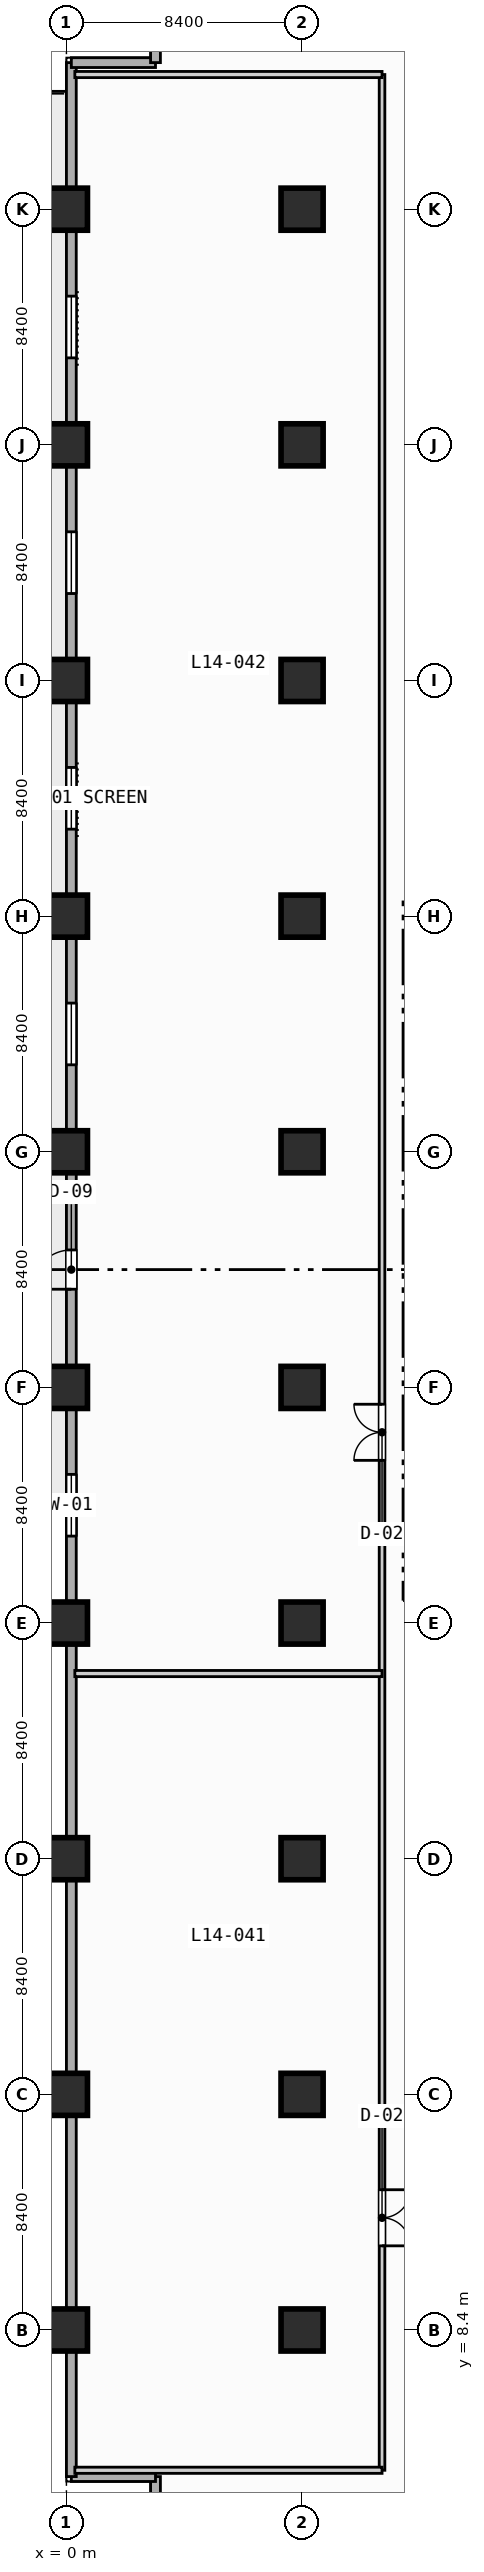
"""IFC4 building model, lengths in metres.
Left out: names, types, materials, properties, quantities, classifications, styles, units other than length and angle.
Written with IfcOpenShell. Run it as: python <this file> out.ifc"""

import sys

from ifc_helpers import new_model, si_unit, direction, frame, frame_2d, origin, origin_2d, place, context, subcontext, project, spatial, rectangle, extrude, element, fill, save


model = new_model("IFC4")
c1 = context("Model", 3, precision=1e-05, world=origin(), true_north=direction((0.0, 1.0)))
c2 = subcontext(c1, "Body", "Model", "MODEL_VIEW")
j1 = project(units=[si_unit("LENGTHUNIT", "METRE"), si_unit("PLANEANGLEUNIT", "RADIAN")], contexts=[c1])
p1 = place(None, origin())
s1 = spatial("IfcSite", under=j1, at=p1, CompositionType="ELEMENT")
p2 = place(p1, origin())
s2 = spatial("IfcBuilding", under=s1, at=p2, CompositionType="ELEMENT")
p3 = place(p2, frame((0.0, 0.0, 62.4)))
s3 = spatial("IfcBuildingStorey", under=s2, at=p3, CompositionType="ELEMENT", Elevation=62.4)
for number, where, z_axis, x_axis in (
    (1, (0.0, 8.4, 0.0), (0.0, 0.0, 1.0), (1.0, 0.0, 0.0)),
    (2, (0.0, 16.8, 0.0), (0.0, 0.0, 1.0), (1.0, 0.0, 0.0)),
    (3, (0.0, 25.2, 0.0), (0.0, 0.0, 1.0), (1.0, 0.0, 0.0)),
    (4, (0.0, 33.6, 0.0), (0.0, 0.0, 1.0), (1.0, 0.0, 0.0)),
    (5, (0.0, 42.0, 0.0), (0.0, 0.0, 1.0), (1.0, 0.0, 0.0)),
    (6, (0.0, 50.4, 0.0), (0.0, 0.0, 1.0), (1.0, 0.0, 0.0)),
    (7, (0.0, 58.8, 0.0), (0.0, 0.0, 1.0), (1.0, 0.0, 0.0)),
    (8, (0.0, 67.2, 0.0), (0.0, 0.0, 1.0), (1.0, 0.0, 0.0)),
    (9, (0.0, 75.6, 0.0), (0.0, 0.0, 1.0), (1.0, 0.0, 0.0)),
    (10, (0.0, 84.0, 0.0), (0.0, 0.0, 1.0), (1.0, 0.0, 0.0)),
    (11, (8.4, 8.4, 0.0), (0.0, 0.0, 1.0), (1.0, 0.0, 0.0)),
    (12, (8.4, 16.8, 0.0), (0.0, 0.0, 1.0), (1.0, 0.0, 0.0)),
    (13, (8.4, 25.2, 0.0), (0.0, 0.0, 1.0), (1.0, 0.0, 0.0)),
    (14, (8.4, 33.6, 0.0), (0.0, 0.0, 1.0), (1.0, 0.0, 0.0)),
    (15, (8.4, 42.0, 0.0), (0.0, 0.0, 1.0), (1.0, 0.0, 0.0)),
    (16, (8.4, 50.4, 0.0), (0.0, 0.0, 1.0), (1.0, 0.0, 0.0)),
    (17, (8.4, 58.8, 0.0), (0.0, 0.0, 1.0), (1.0, 0.0, 0.0)),
    (18, (8.4, 67.2, 0.0), (0.0, 0.0, 1.0), (1.0, 0.0, 0.0)),
    (19, (8.4, 75.6, 0.0), (0.0, 0.0, 1.0), (1.0, 0.0, 0.0)),
    (20, (8.4, 84.0, 0.0), (0.0, 0.0, 1.0), (1.0, 0.0, 0.0)),
):
    element("IfcColumn", number, at=place(p3, frame(where, z_axis=z_axis, x_axis=x_axis)), inside=s3, PredefinedType="COLUMN", context=c2, shape_type="SweptSolid", body=[
        extrude(rectangle(XDim=1.5, YDim=1.5, at=origin_2d()), origin(), (0.0, 0.0, 1.0), 3.8),
    ])
for number, where, z_axis, x_axis in (
    (21, (3.175, 0.175, 0.0), (0.0, 0.0, 1.0), (0.0, 1.0, 0.0)),
    (22, (3.175, 3.175, 0.0), (0.0, 0.0, 1.0), (-1.0, 0.0, 0.0)),
):
    element("IfcWall", number, at=place(p3, frame(where, z_axis=z_axis, x_axis=x_axis)), inside=s3, PredefinedType="STANDARD", context=c2, shape_type="SweptSolid", body=[
        extrude(rectangle(XDim=3.0, YDim=0.35, at=frame_2d((1.5, 0.0))), origin(), (0.0, 0.0, 1.0), 3.55),
    ])
p4 = place(p3, frame((0.175, 3.175, 0.0), z_axis=(0.0, 0.0, 1.0), x_axis=(0.0, 1.0, 0.0)))
e23 = element("IfcWall", 23, at=p4, inside=s3, PredefinedType="STANDARD", context=c2, shape_type="SweptSolid", body=[
    extrude(rectangle(XDim=86.05, YDim=0.35, at=frame_2d((43.025, 0.0))), origin(), (0.0, 0.0, 1.0), 3.55),
])
p5 = place(p4, frame((42.325, 0.0, 0.0)))
e24 = element("IfcOpeningElement", 24, at=p5, cuts=e23, PredefinedType="OPENING", context=c2, shape_type="SweptSolid", body=[
    extrude(rectangle(XDim=1.4, YDim=2.2, at=frame_2d((0.7, 1.1))), frame((0.0, 0.185, 0.0), z_axis=(0.0, -1.0, 0.0), x_axis=(1.0, 0.0, 0.0)), (0.0, 0.0, 1.0), 0.37),
])
p6 = place(p4, frame((33.525, 0.0, 0.85)))
e25 = element("IfcOpeningElement", 25, at=p6, cuts=e23, PredefinedType="OPENING", context=c2, shape_type="SweptSolid", body=[
    extrude(rectangle(XDim=2.2, YDim=1.8, at=frame_2d((1.1, 0.9))), frame((0.0, 0.185, 0.0), z_axis=(0.0, -1.0, 0.0), x_axis=(1.0, 0.0, 0.0)), (0.0, 0.0, 1.0), 0.37),
])
p7 = place(p4, frame((50.325, 0.0, 0.85)))
e26 = element("IfcOpeningElement", 26, at=p7, cuts=e23, PredefinedType="OPENING", context=c2, shape_type="SweptSolid", body=[
    extrude(rectangle(XDim=2.2, YDim=1.8, at=frame_2d((1.1, 0.9))), frame((0.0, 0.185, 0.0), z_axis=(0.0, -1.0, 0.0), x_axis=(1.0, 0.0, 0.0)), (0.0, 0.0, 1.0), 0.37),
])
p8 = place(p4, frame((58.725, 0.0, 0.85)))
e27 = element("IfcOpeningElement", 27, at=p8, cuts=e23, PredefinedType="OPENING", context=c2, shape_type="SweptSolid", body=[
    extrude(rectangle(XDim=2.2, YDim=1.8, at=frame_2d((1.1, 0.9))), frame((0.0, 0.185, 0.0), z_axis=(0.0, -1.0, 0.0), x_axis=(1.0, 0.0, 0.0)), (0.0, 0.0, 1.0), 0.37),
])
p9 = place(p4, frame((67.125, 0.0, 0.85)))
e28 = element("IfcOpeningElement", 28, at=p9, cuts=e23, PredefinedType="OPENING", context=c2, shape_type="SweptSolid", body=[
    extrude(rectangle(XDim=2.2, YDim=1.8, at=frame_2d((1.1, 0.9))), frame((0.0, 0.185, 0.0), z_axis=(0.0, -1.0, 0.0), x_axis=(1.0, 0.0, 0.0)), (0.0, 0.0, 1.0), 0.37),
])
p10 = place(p4, frame((75.525, 0.0, 0.85)))
e29 = element("IfcOpeningElement", 29, at=p10, cuts=e23, PredefinedType="OPENING", context=c2, shape_type="SweptSolid", body=[
    extrude(rectangle(XDim=2.2, YDim=1.8, at=frame_2d((1.1, 0.9))), frame((0.0, 0.185, 0.0), z_axis=(0.0, -1.0, 0.0), x_axis=(1.0, 0.0, 0.0)), (0.0, 0.0, 1.0), 0.37),
])
for number, where, z_axis, x_axis in (
    (30, (0.175, 89.225, 0.0), (0.0, 0.0, 1.0), (1.0, 0.0, 0.0)),
    (31, (3.175, 89.225, 0.0), (0.0, 0.0, 1.0), (0.0, 1.0, 0.0)),
):
    element("IfcWall", number, at=place(p3, frame(where, z_axis=z_axis, x_axis=x_axis)), inside=s3, PredefinedType="STANDARD", context=c2, shape_type="SweptSolid", body=[
        extrude(rectangle(XDim=3.0, YDim=0.35, at=frame_2d((1.5, 0.0))), origin(), (0.0, 0.0, 1.0), 3.55),
    ])
p11 = place(p3, frame((11.25, 3.4, 0.0), z_axis=(0.0, 0.0, 1.0), x_axis=(0.0, 1.0, 0.0)))
e32 = element("IfcWall", 32, at=p11, inside=s3, PredefinedType="PARTITIONING", context=c2, shape_type="SweptSolid", body=[
    extrude(rectangle(XDim=85.4, YDim=0.2, at=frame_2d((42.7, 0.0))), origin(), (0.0, 0.0, 1.0), 3.55),
])
p12 = place(p11, frame((8.0, 0.0, 0.0)))
e33 = element("IfcOpeningElement", 33, at=p12, cuts=e32, PredefinedType="OPENING", context=c2, shape_type="SweptSolid", body=[
    extrude(rectangle(XDim=2.0, YDim=2.15, at=frame_2d((1.0, 1.075))), frame((0.0, 0.11, 0.0), z_axis=(0.0, -1.0, 0.0), x_axis=(1.0, 0.0, 0.0)), (0.0, 0.0, 1.0), 0.22),
])
p13 = place(p11, frame((36.0, 0.0, 0.0)))
e34 = element("IfcOpeningElement", 34, at=p13, cuts=e32, PredefinedType="OPENING", context=c2, shape_type="SweptSolid", body=[
    extrude(rectangle(XDim=2.0, YDim=2.15, at=frame_2d((1.0, 1.075))), frame((0.0, 0.11, 0.0), z_axis=(0.0, -1.0, 0.0), x_axis=(1.0, 0.0, 0.0)), (0.0, 0.0, 1.0), 0.22),
])
for number, where, z_axis, x_axis in (
    (35, (0.3, 3.4, 0.0), (0.0, 0.0, 1.0), (1.0, 0.0, 0.0)),
    (36, (0.3, 31.8, 0.0), (0.0, 0.0, 1.0), (1.0, 0.0, 0.0)),
    (37, (0.3, 88.8, 0.0), (0.0, 0.0, 1.0), (1.0, 0.0, 0.0)),
):
    element("IfcWall", number, at=place(p3, frame(where, z_axis=z_axis, x_axis=x_axis)), inside=s3, PredefinedType="PARTITIONING", context=c2, shape_type="SweptSolid", body=[
        extrude(rectangle(XDim=10.95, YDim=0.22, at=frame_2d((5.475, 0.0))), origin(), (0.0, 0.0, 1.0), 3.55),
    ])
p14 = place(p5, origin())
e38 = element("IfcDoor", 38, at=p14, inside=s3, OperationType="SINGLE_SWING_LEFT", PredefinedType="DOOR", context=c2, shape_type="SweptSolid", body=[
    extrude(rectangle(XDim=1.4, YDim=2.2, at=frame_2d((0.7, 1.1))), frame((0.0, 0.025, 0.0), z_axis=(0.0, -1.0, 0.0), x_axis=(1.0, 0.0, 0.0)), (0.0, 0.0, 1.0), 0.05),
])
fill(e24, e38)
p15 = place(p6, origin())
e39 = element("IfcWindow", 39, at=p15, inside=s3, PartitioningType="SINGLE_PANEL", PredefinedType="WINDOW", context=c2, shape_type="SweptSolid", body=[
    extrude(rectangle(XDim=2.2, YDim=1.8, at=frame_2d((1.1, 0.9))), frame((0.0, 0.03, 0.0), z_axis=(0.0, -1.0, 0.0), x_axis=(1.0, 0.0, 0.0)), (0.0, 0.0, 1.0), 0.06),
])
fill(e25, e39)
p16 = place(p7, origin())
e40 = element("IfcWindow", 40, at=p16, inside=s3, PartitioningType="SINGLE_PANEL", PredefinedType="WINDOW", context=c2, shape_type="SweptSolid", body=[
    extrude(rectangle(XDim=2.2, YDim=1.8, at=frame_2d((1.1, 0.9))), frame((0.0, 0.03, 0.0), z_axis=(0.0, -1.0, 0.0), x_axis=(1.0, 0.0, 0.0)), (0.0, 0.0, 1.0), 0.06),
])
fill(e26, e40)
p17 = place(p8, origin())
e41 = element("IfcWindow", 41, at=p17, inside=s3, PartitioningType="SINGLE_PANEL", PredefinedType="WINDOW", context=c2, shape_type="SweptSolid", body=[
    extrude(rectangle(XDim=2.2, YDim=1.8, at=frame_2d((1.1, 0.9))), frame((0.0, 0.03, 0.0), z_axis=(0.0, -1.0, 0.0), x_axis=(1.0, 0.0, 0.0)), (0.0, 0.0, 1.0), 0.06),
])
fill(e27, e41)
p18 = place(p9, origin())
e42 = element("IfcWindow", 42, at=p18, inside=s3, PartitioningType="SINGLE_PANEL", PredefinedType="WINDOW", context=c2, shape_type="SweptSolid", body=[
    extrude(rectangle(XDim=2.2, YDim=1.8, at=frame_2d((1.1, 0.9))), frame((0.0, 0.03, 0.0), z_axis=(0.0, -1.0, 0.0), x_axis=(1.0, 0.0, 0.0)), (0.0, 0.0, 1.0), 0.06),
])
fill(e28, e42)
p19 = place(p10, origin())
e43 = element("IfcWindow", 43, at=p19, inside=s3, PartitioningType="SINGLE_PANEL", PredefinedType="WINDOW", context=c2, shape_type="SweptSolid", body=[
    extrude(rectangle(XDim=2.2, YDim=1.8, at=frame_2d((1.1, 0.9))), frame((0.0, 0.03, 0.0), z_axis=(0.0, -1.0, 0.0), x_axis=(1.0, 0.0, 0.0)), (0.0, 0.0, 1.0), 0.06),
])
fill(e29, e43)
p20 = place(p12, origin())
e44 = element("IfcDoor", 44, at=p20, inside=s3, OperationType="SINGLE_SWING_RIGHT", PredefinedType="DOOR", context=c2, shape_type="SweptSolid", body=[
    extrude(rectangle(XDim=2.0, YDim=2.15, at=frame_2d((1.0, 1.075))), frame((0.0, 0.025, 0.0), z_axis=(0.0, -1.0, 0.0), x_axis=(1.0, 0.0, 0.0)), (0.0, 0.0, 1.0), 0.05),
])
fill(e33, e44)
p21 = place(p13, origin())
e45 = element("IfcDoor", 45, at=p21, inside=s3, OperationType="SINGLE_SWING_LEFT", PredefinedType="DOOR", context=c2, shape_type="SweptSolid", body=[
    extrude(rectangle(XDim=2.0, YDim=2.15, at=frame_2d((1.0, 1.075))), frame((0.0, 0.025, 0.0), z_axis=(0.0, -1.0, 0.0), x_axis=(1.0, 0.0, 0.0)), (0.0, 0.0, 1.0), 0.05),
])
fill(e34, e45)
save(model, sys.argv[1])
